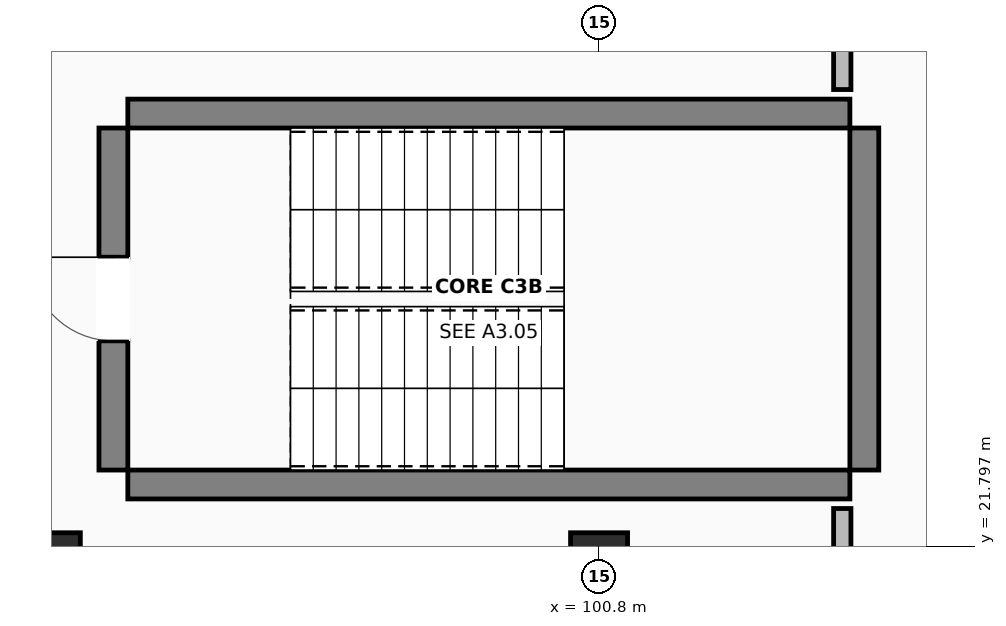
"""IFC4 building model, lengths in metres.
Left out: names, types, materials, properties, quantities, classifications, styles, units other than length and angle.
Written with IfcOpenShell. Run it as: python <this file> out.ifc"""

import sys

from ifc_helpers import new_model, si_unit, direction, frame, frame_2d, origin, origin_2d, place, context, subcontext, project, spatial, rectangle, extrude, element, fill, save


model = new_model("IFC4")
c1 = context("Model", 3, precision=1e-05, world=origin(), true_north=direction((0.0, 1.0)))
c2 = subcontext(c1, "Body", "Model", "MODEL_VIEW")
j1 = project(units=[si_unit("LENGTHUNIT", "METRE"), si_unit("PLANEANGLEUNIT", "RADIAN")], contexts=[c1])
p1 = place(None, origin())
s1 = spatial("IfcSite", under=j1, at=p1, CompositionType="ELEMENT")
p2 = place(p1, origin())
s2 = spatial("IfcBuilding", under=s1, at=p2, CompositionType="ELEMENT")
p3 = place(p2, frame((0.0, 0.0, 18.0)))
s3 = spatial("IfcBuildingStorey", under=s2, at=p3, CompositionType="ELEMENT", Elevation=18.0)
for number, where, z_axis, x_axis in (
    (1, (93.6, 21.6, 0.0), (0.0, 0.0, 1.0), (1.0, 0.0, 0.0)),
    (2, (100.8, 21.6, 0.0), (0.0, 0.0, 1.0), (1.0, 0.0, 0.0)),
):
    element("IfcColumn", number, at=place(p3, frame(where, z_axis=z_axis, x_axis=x_axis)), inside=s3, PredefinedType="COLUMN", context=c2, shape_type="SweptSolid", body=[
        extrude(rectangle(XDim=0.75, YDim=0.75, at=origin_2d()), origin(), (0.0, 0.0, 1.0), 4.22),
    ])
for number, where, z_axis, x_axis in (
    (3, (94.6, 22.61, 0.0), (0.0, 0.0, 1.0), (1.0, 0.0, 0.0)),
    (4, (94.6, 27.49, 0.0), (0.0, 0.0, 1.0), (1.0, 0.0, 0.0)),
):
    element("IfcWall", number, at=place(p3, frame(where, z_axis=z_axis, x_axis=x_axis)), inside=s3, PredefinedType="SHEAR", context=c2, shape_type="SweptSolid", body=[
        extrude(rectangle(XDim=9.5, YDim=0.38, at=frame_2d((4.75, 0.0))), origin(), (0.0, 0.0, 1.0), 4.22),
    ])
p4 = place(p3, frame((94.41, 22.8, 0.0), z_axis=(0.0, 0.0, 1.0), x_axis=(0.0, 1.0, 0.0)))
e5 = element("IfcWall", 5, at=p4, inside=s3, PredefinedType="SHEAR", context=c2, shape_type="SweptSolid", body=[
    extrude(rectangle(XDim=4.5, YDim=0.38, at=frame_2d((2.25, 0.0))), origin(), (0.0, 0.0, 1.0), 4.22),
])
p5 = place(p4, frame((1.7, 0.0, 0.0)))
e6 = element("IfcOpeningElement", 6, at=p5, cuts=e5, PredefinedType="OPENING", context=c2, shape_type="SweptSolid", body=[
    extrude(rectangle(XDim=1.1, YDim=2.15, at=frame_2d((0.55, 1.075))), frame((0.0, 0.2, 0.0), z_axis=(0.0, -1.0, 0.0), x_axis=(1.0, 0.0, 0.0)), (0.0, 0.0, 1.0), 0.4),
])
p6 = place(p3, frame((104.29, 22.8, 0.0), z_axis=(0.0, 0.0, 1.0), x_axis=(0.0, 1.0, 0.0)))
e7 = element("IfcWall", 7, at=p6, inside=s3, PredefinedType="SHEAR", context=c2, shape_type="SweptSolid", body=[
    extrude(rectangle(XDim=4.5, YDim=0.38, at=frame_2d((2.25, 0.0))), origin(), (0.0, 0.0, 1.0), 4.22),
])
p7 = place(p3, frame((104.0, 17.802, 0.0), z_axis=(0.0, 0.0, 1.0), x_axis=(0.0, 1.0, 0.0)))
e8 = element("IfcWall", 8, at=p7, inside=s3, PredefinedType="PARTITIONING", context=c2, shape_type="SweptSolid", body=[
    extrude(rectangle(XDim=4.492, YDim=0.228, at=frame_2d((2.246, 0.0))), origin(), (0.0, 0.0, 1.0), 3.26),
])
p8 = place(p3, frame((104.0, 27.806, 0.0), z_axis=(0.0, 0.0, 1.0), x_axis=(0.0, 1.0, 0.0)))
e9 = element("IfcWall", 9, at=p8, inside=s3, PredefinedType="PARTITIONING", context=c2, shape_type="SweptSolid", body=[
    extrude(rectangle(XDim=2.374, YDim=0.228, at=frame_2d((1.187, 0.0))), origin(), (0.0, 0.0, 1.0), 3.26),
])
p9 = place(p5, origin())
e10 = element("IfcDoor", 10, at=p9, inside=s3, OperationType="SINGLE_SWING_RIGHT", PredefinedType="DOOR", context=c2, shape_type="SweptSolid", body=[
    extrude(rectangle(XDim=1.1, YDim=2.15, at=frame_2d((0.55, 1.075))), frame((0.0, 0.025, 0.0), z_axis=(0.0, -1.0, 0.0), x_axis=(1.0, 0.0, 0.0)), (0.0, 0.0, 1.0), 0.05),
])
fill(e6, e10)
save(model, sys.argv[1])
